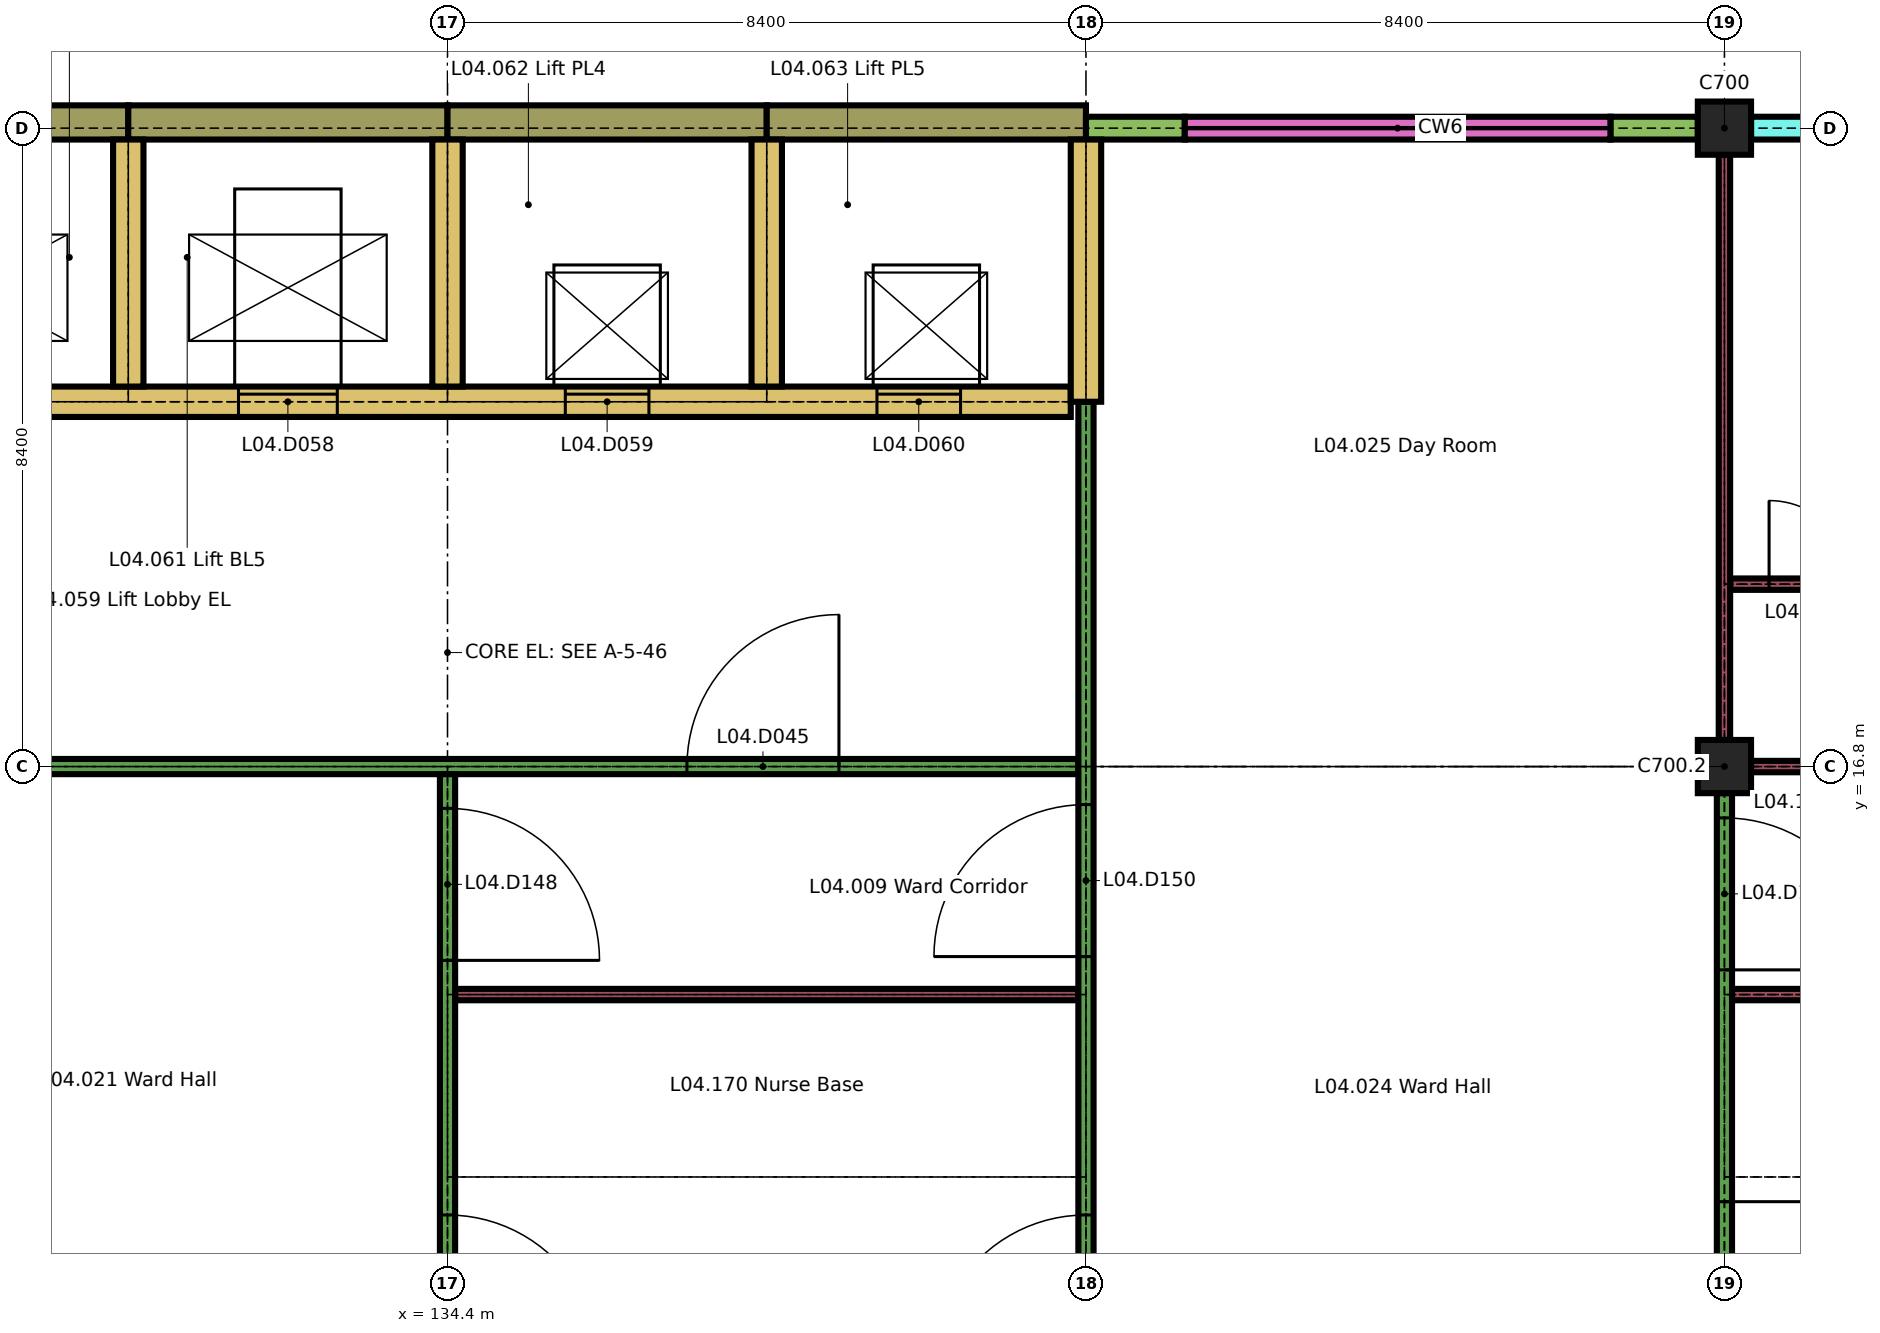
"""IFC4 building model, lengths in metres.
Left out: names, types, materials, properties, quantities, classifications, styles, units other than length and angle.
Written with IfcOpenShell. Run it as: python <this file> out.ifc"""

import sys

from ifc_helpers import new_model, si_unit, direction, frame, frame_2d, origin, origin_2d, place, context, subcontext, project, spatial, rectangle, extrude, element, fill, save


model = new_model("IFC4")
c1 = context("Model", 3, precision=1e-05, world=origin(), true_north=direction((0.0, 1.0)))
c2 = subcontext(c1, "Body", "Model", "MODEL_VIEW")
j1 = project(units=[si_unit("LENGTHUNIT", "METRE"), si_unit("PLANEANGLEUNIT", "RADIAN")], contexts=[c1])
p1 = place(None, origin())
s1 = spatial("IfcSite", under=j1, at=p1, CompositionType="ELEMENT")
p2 = place(p1, origin())
s2 = spatial("IfcBuilding", under=s1, at=p2, CompositionType="ELEMENT")
p3 = place(p2, frame((0.0, 0.0, 18.9)))
s3 = spatial("IfcBuildingStorey", under=s2, at=p3, CompositionType="ELEMENT", Elevation=18.9)
for number, where, z_axis, x_axis in (
    (1, (151.2, 16.8, 0.0), (0.0, 0.0, 1.0), (1.0, 0.0, 0.0)),
    (2, (151.2, 25.2, 0.0), (0.0, 0.0, 1.0), (1.0, 0.0, 0.0)),
):
    element("IfcColumn", number, at=place(p3, frame(where, z_axis=z_axis, x_axis=x_axis)), inside=s3, PredefinedType="COLUMN", context=c2, shape_type="SweptSolid", body=[
        extrude(rectangle(XDim=0.7, YDim=0.7, at=origin_2d()), origin(), (0.0, 0.0, 1.0), 3.26),
    ])
for number, where, z_axis, x_axis in (
    (3, (126.0, 25.275, 0.0), (0.0, 0.0, 1.0), (1.0, 0.0, 0.0)),
    (4, (130.2, 25.275, 0.0), (0.0, 0.0, 1.0), (1.0, 0.0, 0.0)),
):
    element("IfcWall", number, at=place(p3, frame(where, z_axis=z_axis, x_axis=x_axis)), inside=s3, PredefinedType="SOLIDWALL", context=c2, shape_type="SweptSolid", body=[
        extrude(rectangle(XDim=4.2, YDim=0.45, at=frame_2d((2.1, 0.0))), origin(), (0.0, 0.0, 1.0), 3.26),
    ])
p4 = place(p3, frame((134.4, 25.275, 0.0), z_axis=(0.0, 0.0, 1.0), x_axis=(1.0, 0.0, 0.0)))
e5 = element("IfcWall", 5, at=p4, inside=s3, PredefinedType="SOLIDWALL", context=c2, shape_type="SweptSolid", body=[
    extrude(rectangle(XDim=4.2, YDim=0.45, at=frame_2d((2.1, 0.0))), origin(), (0.0, 0.0, 1.0), 3.26),
])
p5 = place(p3, frame((138.6, 25.275, 0.0), z_axis=(0.0, 0.0, 1.0), x_axis=(1.0, 0.0, 0.0)))
e6 = element("IfcWall", 6, at=p5, inside=s3, PredefinedType="SOLIDWALL", context=c2, shape_type="SweptSolid", body=[
    extrude(rectangle(XDim=4.2, YDim=0.45, at=frame_2d((2.1, 0.0))), origin(), (0.0, 0.0, 1.0), 3.26),
])
p6 = place(p3, frame((142.8, 25.2, 0.0), z_axis=(0.0, 0.0, 1.0), x_axis=(1.0, 0.0, 0.0)))
e7 = element("IfcWall", 7, at=p6, inside=s3, PredefinedType="SOLIDWALL", context=c2, shape_type="SweptSolid", body=[
    extrude(rectangle(XDim=1.3, YDim=0.3, at=frame_2d((0.65, 0.0))), origin(), (0.0, 0.0, 1.0), 2.96),
])
p7 = place(p3, frame((149.7, 25.2, 0.0), z_axis=(0.0, 0.0, 1.0), x_axis=(1.0, 0.0, 0.0)))
e8 = element("IfcWall", 8, at=p7, inside=s3, PredefinedType="SOLIDWALL", context=c2, shape_type="SweptSolid", body=[
    extrude(rectangle(XDim=1.15, YDim=0.3, at=frame_2d((0.575, 0.0))), origin(), (0.0, 0.0, 1.0), 2.96),
])
p8 = place(p3, frame((144.1, 25.2, 0.0), z_axis=(0.0, 0.0, 1.0), x_axis=(1.0, 0.0, 0.0)))
e9 = element("IfcWall", 9, at=p8, inside=s3, PredefinedType="SOLIDWALL", context=c2, shape_type="SweptSolid", body=[
    extrude(rectangle(XDim=5.6, YDim=0.3, at=frame_2d((2.8, 0.0))), origin(), (0.0, 0.0, 1.0), 0.6),
])
p9 = place(p3, frame((151.55, 25.2, 0.0), z_axis=(0.0, 0.0, 1.0), x_axis=(1.0, 0.0, 0.0)))
e10 = element("IfcWall", 10, at=p9, inside=s3, PredefinedType="SOLIDWALL", context=c2, shape_type="SweptSolid", body=[
    extrude(rectangle(XDim=3.85, YDim=0.3, at=frame_2d((1.925, 0.0))), origin(), (0.0, 0.0, 1.0), 3.26),
])
p10 = place(p9, frame((0.7, 0.0, 0.9)))
e11 = element("IfcOpeningElement", 11, at=p10, cuts=e10, PredefinedType="OPENING", context=c2, shape_type="SweptSolid", body=[
    extrude(rectangle(XDim=2.1, YDim=1.5, at=frame_2d((1.05, 0.75))), frame((0.0, 0.16, 0.0), z_axis=(0.0, -1.0, 0.0), x_axis=(1.0, 0.0, 0.0)), (0.0, 0.0, 1.0), 0.32),
])
p11 = place(p3, frame((134.5, 13.8, 0.0), z_axis=(0.0, 0.0, 1.0), x_axis=(1.0, 0.0, 0.0)))
e12 = element("IfcWall", 12, at=p11, inside=s3, PredefinedType="PARTITIONING", context=c2, shape_type="SweptSolid", body=[
    extrude(rectangle(XDim=8.2, YDim=0.15, at=frame_2d((4.1, 0.0))), origin(), (0.0, 0.0, 1.0), 3.26),
])
p12 = place(p3, frame((151.3, 13.8, 0.0), z_axis=(0.0, 0.0, 1.0), x_axis=(1.0, 0.0, 0.0)))
e13 = element("IfcWall", 13, at=p12, inside=s3, PredefinedType="PARTITIONING", context=c2, shape_type="SweptSolid", body=[
    extrude(rectangle(XDim=5.375, YDim=0.15, at=frame_2d((2.688, 0.0))), origin(), (0.0, 0.0, 1.0), 3.26),
])
p13 = place(p3, frame((117.5, 16.8, 0.0), z_axis=(0.0, 0.0, 1.0), x_axis=(1.0, 0.0, 0.0)))
e14 = element("IfcWall", 14, at=p13, inside=s3, PredefinedType="PARTITIONING", context=c2, shape_type="SweptSolid", body=[
    extrude(rectangle(XDim=25.2, YDim=0.2, at=frame_2d((12.6, 0.0))), origin(), (0.0, 0.0, 1.0), 3.26),
])
p14 = place(p13, frame((3.3, 0.0, 0.0)))
e15 = element("IfcOpeningElement", 15, at=p14, cuts=e14, PredefinedType="OPENING", context=c2, shape_type="SweptSolid", body=[
    extrude(rectangle(XDim=2.0, YDim=2.4, at=frame_2d((1.0, 1.2))), frame((0.0, 0.11, 0.0), z_axis=(0.0, -1.0, 0.0), x_axis=(1.0, 0.0, 0.0)), (0.0, 0.0, 1.0), 0.22),
])
p15 = place(p13, frame((20.05, 0.0, 0.0)))
e16 = element("IfcOpeningElement", 16, at=p15, cuts=e14, PredefinedType="OPENING", context=c2, shape_type="SweptSolid", body=[
    extrude(rectangle(XDim=2.0, YDim=2.4, at=frame_2d((1.0, 1.2))), frame((0.0, 0.11, 0.0), z_axis=(0.0, -1.0, 0.0), x_axis=(1.0, 0.0, 0.0)), (0.0, 0.0, 1.0), 0.22),
])
p16 = place(p3, frame((151.55, 16.8, 0.0), z_axis=(0.0, 0.0, 1.0), x_axis=(1.0, 0.0, 0.0)))
e17 = element("IfcWall", 17, at=p16, inside=s3, PredefinedType="PARTITIONING", context=c2, shape_type="SweptSolid", body=[
    extrude(rectangle(XDim=8.05, YDim=0.15, at=frame_2d((4.025, 0.0))), origin(), (0.0, 0.0, 1.0), 3.26),
])
p17 = place(p16, frame((2.1, 0.0, 0.0)))
e18 = element("IfcOpeningElement", 18, at=p17, cuts=e17, PredefinedType="OPENING", context=c2, shape_type="SweptSolid", body=[
    extrude(rectangle(XDim=1.5, YDim=2.4, at=frame_2d((0.75, 1.2))), frame((0.0, 0.085, 0.0), z_axis=(0.0, -1.0, 0.0), x_axis=(1.0, 0.0, 0.0)), (0.0, 0.0, 1.0), 0.17),
])
p18 = place(p16, frame((4.1, 0.0, 0.0)))
e19 = element("IfcOpeningElement", 19, at=p18, cuts=e17, PredefinedType="OPENING", context=c2, shape_type="SweptSolid", body=[
    extrude(rectangle(XDim=1.5, YDim=2.4, at=frame_2d((0.75, 1.2))), frame((0.0, 0.085, 0.0), z_axis=(0.0, -1.0, 0.0), x_axis=(1.0, 0.0, 0.0)), (0.0, 0.0, 1.0), 0.17),
])
p19 = place(p3, frame((151.275, 19.2, 0.0), z_axis=(0.0, 0.0, 1.0), x_axis=(1.0, 0.0, 0.0)))
e20 = element("IfcWall", 20, at=p19, inside=s3, PredefinedType="PARTITIONING", context=c2, shape_type="SweptSolid", body=[
    extrude(rectangle(XDim=2.2, YDim=0.15, at=frame_2d((1.1, 0.0))), origin(), (0.0, 0.0, 1.0), 3.26),
])
p20 = place(p19, frame((0.512, 0.0, 0.0)))
e21 = element("IfcOpeningElement", 21, at=p20, cuts=e20, PredefinedType="OPENING", context=c2, shape_type="SweptSolid", body=[
    extrude(rectangle(XDim=1.1, YDim=2.1, at=frame_2d((0.55, 1.05))), frame((0.0, 0.085, 0.0), z_axis=(0.0, -1.0, 0.0), x_axis=(1.0, 0.0, 0.0)), (0.0, 0.0, 1.0), 0.17),
])
p21 = place(p3, frame((117.8, 21.6, 0.0), z_axis=(0.0, 0.0, 1.0), x_axis=(1.0, 0.0, 0.0)))
e22 = element("IfcWall", 22, at=p21, inside=s3, PredefinedType="SHEAR", context=c2, shape_type="SweptSolid", body=[
    extrude(rectangle(XDim=24.8, YDim=0.4, at=frame_2d((12.4, 0.0))), origin(), (0.0, 0.0, 1.0), 3.26),
])
p22 = place(p21, frame((1.35, 0.0, 0.0)))
e23 = element("IfcOpeningElement", 23, at=p22, cuts=e22, PredefinedType="OPENING", context=c2, shape_type="SweptSolid", body=[
    extrude(rectangle(XDim=1.3, YDim=2.1, at=frame_2d((0.65, 1.05))), frame((0.0, 0.21, 0.0), z_axis=(0.0, -1.0, 0.0), x_axis=(1.0, 0.0, 0.0)), (0.0, 0.0, 1.0), 0.42),
])
p23 = place(p21, frame((5.45, 0.0, 0.0)))
e24 = element("IfcOpeningElement", 24, at=p23, cuts=e22, PredefinedType="OPENING", context=c2, shape_type="SweptSolid", body=[
    extrude(rectangle(XDim=1.3, YDim=2.1, at=frame_2d((0.65, 1.05))), frame((0.0, 0.21, 0.0), z_axis=(0.0, -1.0, 0.0), x_axis=(1.0, 0.0, 0.0)), (0.0, 0.0, 1.0), 0.42),
])
p24 = place(p21, frame((9.65, 0.0, 0.0)))
e25 = element("IfcOpeningElement", 25, at=p24, cuts=e22, PredefinedType="OPENING", context=c2, shape_type="SweptSolid", body=[
    extrude(rectangle(XDim=1.3, YDim=2.1, at=frame_2d((0.65, 1.05))), frame((0.0, 0.21, 0.0), z_axis=(0.0, -1.0, 0.0), x_axis=(1.0, 0.0, 0.0)), (0.0, 0.0, 1.0), 0.42),
])
p25 = place(p21, frame((13.85, 0.0, 0.0)))
e26 = element("IfcOpeningElement", 26, at=p25, cuts=e22, PredefinedType="OPENING", context=c2, shape_type="SweptSolid", body=[
    extrude(rectangle(XDim=1.3, YDim=2.1, at=frame_2d((0.65, 1.05))), frame((0.0, 0.21, 0.0), z_axis=(0.0, -1.0, 0.0), x_axis=(1.0, 0.0, 0.0)), (0.0, 0.0, 1.0), 0.42),
])
p26 = place(p21, frame((18.15, 0.0, 0.0)))
e27 = element("IfcOpeningElement", 27, at=p26, cuts=e22, PredefinedType="OPENING", context=c2, shape_type="SweptSolid", body=[
    extrude(rectangle(XDim=1.1, YDim=2.1, at=frame_2d((0.55, 1.05))), frame((0.0, 0.21, 0.0), z_axis=(0.0, -1.0, 0.0), x_axis=(1.0, 0.0, 0.0)), (0.0, 0.0, 1.0), 0.42),
])
p27 = place(p21, frame((22.25, 0.0, 0.0)))
e28 = element("IfcOpeningElement", 28, at=p27, cuts=e22, PredefinedType="OPENING", context=c2, shape_type="SweptSolid", body=[
    extrude(rectangle(XDim=1.1, YDim=2.1, at=frame_2d((0.55, 1.05))), frame((0.0, 0.21, 0.0), z_axis=(0.0, -1.0, 0.0), x_axis=(1.0, 0.0, 0.0)), (0.0, 0.0, 1.0), 0.42),
])
p28 = place(p3, frame((130.2, 21.8, 0.0), z_axis=(0.0, 0.0, 1.0), x_axis=(0.0, 1.0, 0.0)))
e29 = element("IfcWall", 29, at=p28, inside=s3, PredefinedType="SHEAR", context=c2, shape_type="SweptSolid", body=[
    extrude(rectangle(XDim=3.25, YDim=0.4, at=frame_2d((1.625, 0.0))), origin(), (0.0, 0.0, 1.0), 3.26),
])
p29 = place(p3, frame((134.4, 3.6, 0.0), z_axis=(0.0, 0.0, 1.0), x_axis=(0.0, 1.0, 0.0)))
e30 = element("IfcWall", 30, at=p29, inside=s3, PredefinedType="PARTITIONING", context=c2, shape_type="SweptSolid", body=[
    extrude(rectangle(XDim=13.1, YDim=0.2, at=frame_2d((6.55, 0.0))), origin(), (0.0, 0.0, 1.0), 3.26),
])
p30 = place(p29, frame((5.3, 0.0, 0.0)))
e31 = element("IfcOpeningElement", 31, at=p30, cuts=e30, PredefinedType="OPENING", context=c2, shape_type="SweptSolid", body=[
    extrude(rectangle(XDim=2.0, YDim=2.4, at=frame_2d((1.0, 1.2))), frame((0.0, 0.11, 0.0), z_axis=(0.0, -1.0, 0.0), x_axis=(1.0, 0.0, 0.0)), (0.0, 0.0, 1.0), 0.22),
])
p31 = place(p29, frame((10.65, 0.0, 0.0)))
e32 = element("IfcOpeningElement", 32, at=p31, cuts=e30, PredefinedType="OPENING", context=c2, shape_type="SweptSolid", body=[
    extrude(rectangle(XDim=2.0, YDim=2.4, at=frame_2d((1.0, 1.2))), frame((0.0, 0.11, 0.0), z_axis=(0.0, -1.0, 0.0), x_axis=(1.0, 0.0, 0.0)), (0.0, 0.0, 1.0), 0.22),
])
for number, where, z_axis, x_axis in (
    (33, (134.4, 21.8, 0.0), (0.0, 0.0, 1.0), (0.0, 1.0, 0.0)),
    (34, (138.6, 21.8, 0.0), (0.0, 0.0, 1.0), (0.0, 1.0, 0.0)),
):
    element("IfcWall", number, at=place(p3, frame(where, z_axis=z_axis, x_axis=x_axis)), inside=s3, PredefinedType="SHEAR", context=c2, shape_type="SweptSolid", body=[
        extrude(rectangle(XDim=3.25, YDim=0.4, at=frame_2d((1.625, 0.0))), origin(), (0.0, 0.0, 1.0), 3.26),
    ])
p32 = place(p3, frame((142.8, 3.6, 0.0), z_axis=(0.0, 0.0, 1.0), x_axis=(0.0, 1.0, 0.0)))
e35 = element("IfcWall", 35, at=p32, inside=s3, PredefinedType="PARTITIONING", context=c2, shape_type="SweptSolid", body=[
    extrude(rectangle(XDim=18.0, YDim=0.2, at=frame_2d((9.0, 0.0))), origin(), (0.0, 0.0, 1.0), 3.26),
])
p33 = place(p32, frame((5.3, 0.0, 0.0)))
e36 = element("IfcOpeningElement", 36, at=p33, cuts=e35, PredefinedType="OPENING", context=c2, shape_type="SweptSolid", body=[
    extrude(rectangle(XDim=2.0, YDim=2.4, at=frame_2d((1.0, 1.2))), frame((0.0, 0.11, 0.0), z_axis=(0.0, -1.0, 0.0), x_axis=(1.0, 0.0, 0.0)), (0.0, 0.0, 1.0), 0.22),
])
p34 = place(p32, frame((10.7, 0.0, 0.0)))
e37 = element("IfcOpeningElement", 37, at=p34, cuts=e35, PredefinedType="OPENING", context=c2, shape_type="SweptSolid", body=[
    extrude(rectangle(XDim=2.0, YDim=2.4, at=frame_2d((1.0, 1.2))), frame((0.0, 0.11, 0.0), z_axis=(0.0, -1.0, 0.0), x_axis=(1.0, 0.0, 0.0)), (0.0, 0.0, 1.0), 0.22),
])
p35 = place(p3, frame((142.8, 21.6, 0.0), z_axis=(0.0, 0.0, 1.0), x_axis=(0.0, 1.0, 0.0)))
e38 = element("IfcWall", 38, at=p35, inside=s3, PredefinedType="SHEAR", context=c2, shape_type="SweptSolid", body=[
    extrude(rectangle(XDim=3.45, YDim=0.4, at=frame_2d((1.725, 0.0))), origin(), (0.0, 0.0, 1.0), 3.26),
])
p36 = place(p3, frame((151.2, 8.75, 0.0), z_axis=(0.0, 0.0, 1.0), x_axis=(0.0, 1.0, 0.0)))
e39 = element("IfcWall", 39, at=p36, inside=s3, PredefinedType="PARTITIONING", context=c2, shape_type="SweptSolid", body=[
    extrude(rectangle(XDim=7.7, YDim=0.2, at=frame_2d((3.85, 0.0))), origin(), (0.0, 0.0, 1.0), 3.26),
])
p37 = place(p36, frame((0.325, 0.0, 0.0)))
e40 = element("IfcOpeningElement", 40, at=p37, cuts=e39, PredefinedType="OPENING", context=c2, shape_type="SweptSolid", body=[
    extrude(rectangle(XDim=2.0, YDim=2.4, at=frame_2d((1.0, 1.2))), frame((0.0, 0.11, 0.0), z_axis=(0.0, -1.0, 0.0), x_axis=(1.0, 0.0, 0.0)), (0.0, 0.0, 1.0), 0.22),
])
p38 = place(p36, frame((5.375, 0.0, 0.0)))
e41 = element("IfcOpeningElement", 41, at=p38, cuts=e39, PredefinedType="OPENING", context=c2, shape_type="SweptSolid", body=[
    extrude(rectangle(XDim=2.0, YDim=2.4, at=frame_2d((1.0, 1.2))), frame((0.0, 0.11, 0.0), z_axis=(0.0, -1.0, 0.0), x_axis=(1.0, 0.0, 0.0)), (0.0, 0.0, 1.0), 0.22),
])
p39 = place(p3, frame((151.2, 17.15, 0.0), z_axis=(0.0, 0.0, 1.0), x_axis=(0.0, 1.0, 0.0)))
e42 = element("IfcWall", 42, at=p39, inside=s3, PredefinedType="PARTITIONING", context=c2, shape_type="SweptSolid", body=[
    extrude(rectangle(XDim=7.7, YDim=0.15, at=frame_2d((3.85, 0.0))), origin(), (0.0, 0.0, 1.0), 3.26),
])
p40 = place(p15, origin())
e43 = element("IfcDoor", 43, at=p40, inside=s3, OperationType="SINGLE_SWING_LEFT", PredefinedType="DOOR", context=c2, shape_type="SweptSolid", body=[
    extrude(rectangle(XDim=2.0, YDim=2.4, at=frame_2d((1.0, 1.2))), frame((0.0, 0.03, 0.0), z_axis=(0.0, -1.0, 0.0), x_axis=(1.0, 0.0, 0.0)), (0.0, 0.0, 1.0), 0.06),
])
fill(e16, e43)
p41 = place(p20, origin())
e44 = element("IfcDoor", 44, at=p41, inside=s3, OperationType="SINGLE_SWING_RIGHT", PredefinedType="DOOR", context=c2, shape_type="SweptSolid", body=[
    extrude(rectangle(XDim=1.1, YDim=2.1, at=frame_2d((0.55, 1.05))), frame((0.0, 0.025, 0.0), z_axis=(0.0, -1.0, 0.0), x_axis=(1.0, 0.0, 0.0)), (0.0, 0.0, 1.0), 0.05),
])
fill(e21, e44)
p42 = place(p25, origin())
e45 = element("IfcDoor", 45, at=p42, inside=s3, OperationType="SLIDING_TO_LEFT", PredefinedType="DOOR", context=c2, shape_type="SweptSolid", body=[
    extrude(rectangle(XDim=1.3, YDim=2.1, at=frame_2d((0.65, 1.05))), frame((0.0, 0.025, 0.0), z_axis=(0.0, -1.0, 0.0), x_axis=(1.0, 0.0, 0.0)), (0.0, 0.0, 1.0), 0.05),
])
fill(e26, e45)
p43 = place(p26, origin())
e46 = element("IfcDoor", 46, at=p43, inside=s3, OperationType="SLIDING_TO_LEFT", PredefinedType="DOOR", context=c2, shape_type="SweptSolid", body=[
    extrude(rectangle(XDim=1.1, YDim=2.1, at=frame_2d((0.55, 1.05))), frame((0.0, 0.025, 0.0), z_axis=(0.0, -1.0, 0.0), x_axis=(1.0, 0.0, 0.0)), (0.0, 0.0, 1.0), 0.05),
])
fill(e27, e46)
p44 = place(p27, origin())
e47 = element("IfcDoor", 47, at=p44, inside=s3, OperationType="SLIDING_TO_LEFT", PredefinedType="DOOR", context=c2, shape_type="SweptSolid", body=[
    extrude(rectangle(XDim=1.1, YDim=2.1, at=frame_2d((0.55, 1.05))), frame((0.0, 0.025, 0.0), z_axis=(0.0, -1.0, 0.0), x_axis=(1.0, 0.0, 0.0)), (0.0, 0.0, 1.0), 0.05),
])
fill(e28, e47)
p45 = place(p30, origin())
e48 = element("IfcDoor", 48, at=p45, inside=s3, OperationType="SINGLE_SWING_LEFT", PredefinedType="DOOR", context=c2, shape_type="SweptSolid", body=[
    extrude(rectangle(XDim=2.0, YDim=2.4, at=frame_2d((1.0, 1.2))), frame((0.0, 0.03, 0.0), z_axis=(0.0, -1.0, 0.0), x_axis=(1.0, 0.0, 0.0)), (0.0, 0.0, 1.0), 0.06),
])
fill(e31, e48)
p46 = place(p31, origin())
e49 = element("IfcDoor", 49, at=p46, inside=s3, OperationType="SINGLE_SWING_LEFT", PredefinedType="DOOR", context=c2, shape_type="SweptSolid", body=[
    extrude(rectangle(XDim=2.0, YDim=2.4, at=frame_2d((1.0, 1.2))), frame((0.0, 0.03, 0.0), z_axis=(0.0, -1.0, 0.0), x_axis=(1.0, 0.0, 0.0)), (0.0, 0.0, 1.0), 0.06),
])
fill(e32, e49)
p47 = place(p33, origin())
e50 = element("IfcDoor", 50, at=p47, inside=s3, OperationType="SINGLE_SWING_RIGHT", PredefinedType="DOOR", context=c2, shape_type="SweptSolid", body=[
    extrude(rectangle(XDim=2.0, YDim=2.4, at=frame_2d((1.0, 1.2))), frame((0.0, 0.03, 0.0), z_axis=(0.0, -1.0, 0.0), x_axis=(1.0, 0.0, 0.0)), (0.0, 0.0, 1.0), 0.06),
])
fill(e36, e50)
p48 = place(p34, origin())
e51 = element("IfcDoor", 51, at=p48, inside=s3, OperationType="SINGLE_SWING_RIGHT", PredefinedType="DOOR", context=c2, shape_type="SweptSolid", body=[
    extrude(rectangle(XDim=2.0, YDim=2.4, at=frame_2d((1.0, 1.2))), frame((0.0, 0.03, 0.0), z_axis=(0.0, -1.0, 0.0), x_axis=(1.0, 0.0, 0.0)), (0.0, 0.0, 1.0), 0.06),
])
fill(e37, e51)
p49 = place(p37, origin())
e52 = element("IfcDoor", 52, at=p49, inside=s3, OperationType="SINGLE_SWING_RIGHT", PredefinedType="DOOR", context=c2, shape_type="SweptSolid", body=[
    extrude(rectangle(XDim=2.0, YDim=2.4, at=frame_2d((1.0, 1.2))), frame((0.0, 0.03, 0.0), z_axis=(0.0, -1.0, 0.0), x_axis=(1.0, 0.0, 0.0)), (0.0, 0.0, 1.0), 0.06),
])
fill(e40, e52)
p50 = place(p38, origin())
e53 = element("IfcDoor", 53, at=p50, inside=s3, OperationType="SINGLE_SWING_LEFT", PredefinedType="DOOR", context=c2, shape_type="SweptSolid", body=[
    extrude(rectangle(XDim=2.0, YDim=2.4, at=frame_2d((1.0, 1.2))), frame((0.0, 0.03, 0.0), z_axis=(0.0, -1.0, 0.0), x_axis=(1.0, 0.0, 0.0)), (0.0, 0.0, 1.0), 0.06),
])
fill(e41, e53)
save(model, sys.argv[1])
